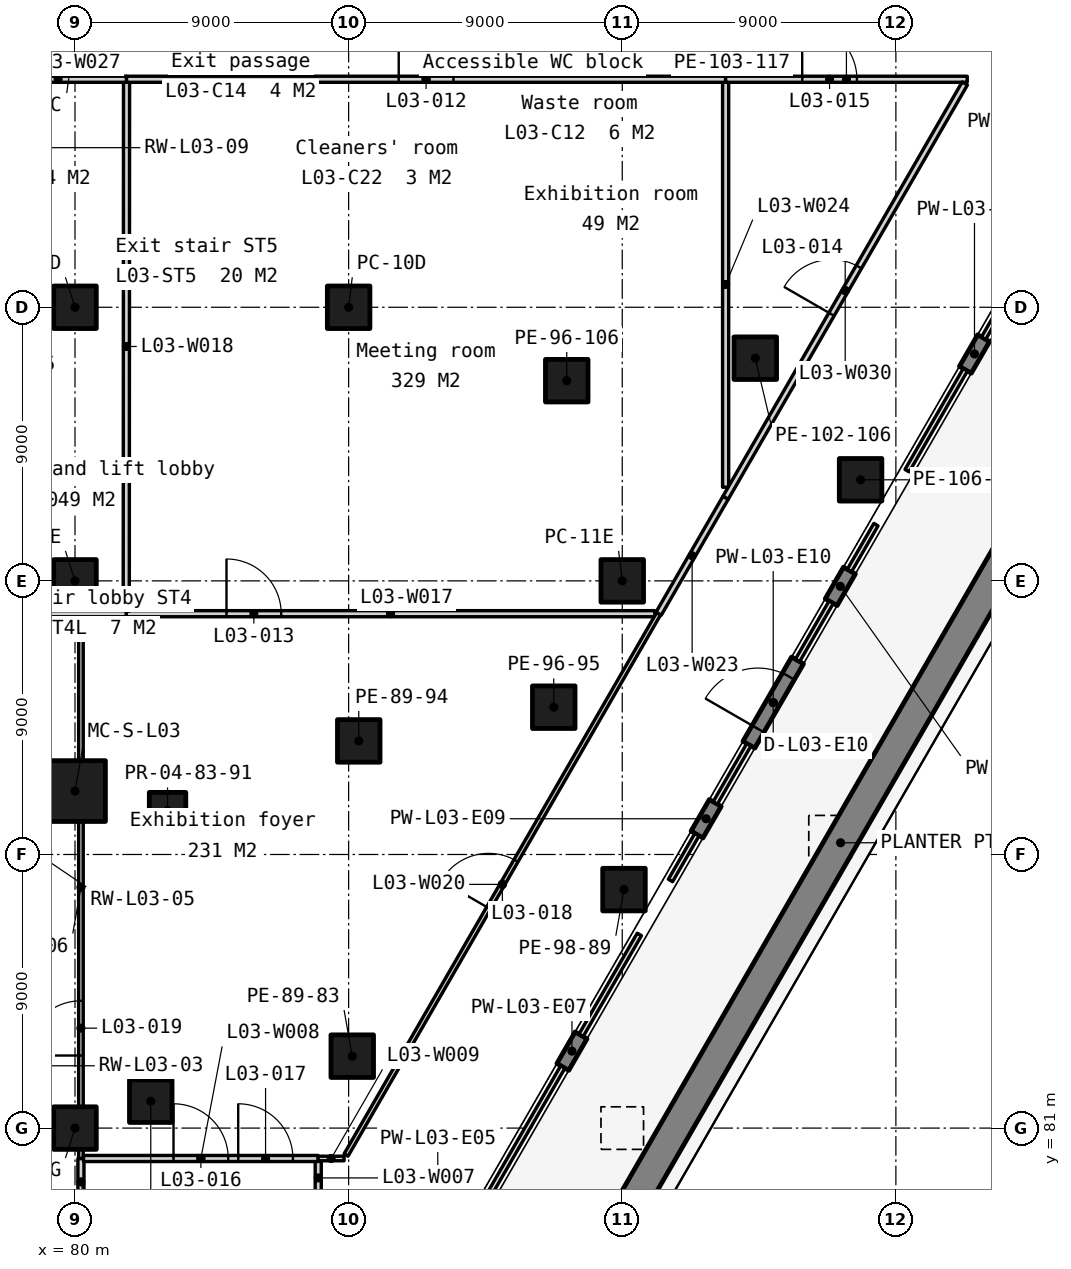
"""IFC4 building model, lengths in metres.
Left out: names, types, materials, properties, quantities, classifications, styles, units other than length and angle.
Written with IfcOpenShell. Run it as: python <this file> out.ifc"""

import sys

from ifc_helpers import new_model, si_unit, direction, frame, frame_2d, origin, origin_2d, place, context, subcontext, project, spatial, rectangle, extrude, element, fill, save


model = new_model("IFC4")
c1 = context("Model", 3, precision=1e-05, world=origin(), true_north=direction((0.0, 1.0)))
c2 = subcontext(c1, "Body", "Model", "MODEL_VIEW")
j1 = project(units=[si_unit("LENGTHUNIT", "METRE"), si_unit("PLANEANGLEUNIT", "RADIAN")], contexts=[c1])
p1 = place(None, origin())
s1 = spatial("IfcSite", under=j1, at=p1, CompositionType="ELEMENT")
p2 = place(p1, origin())
s2 = spatial("IfcBuilding", under=s1, at=p2, CompositionType="ELEMENT")
p3 = place(p2, frame((0.0, 0.0, 19.5)))
s3 = spatial("IfcBuildingStorey", under=s2, at=p3, CompositionType="ELEMENT", Elevation=19.5)
for number, where, z_axis, x_axis in (
    (1, (89.0, 108.0, 0.0), (0.0, 0.0, 1.0), (1.0, 0.0, 0.0)),
    (2, (98.0, 99.0, 0.0), (0.0, 0.0, 1.0), (1.0, 0.0, 0.0)),
    (3, (80.0, 117.0, 0.0), (0.0, 0.0, 1.0), (1.0, 0.0, 0.0)),
    (4, (80.0, 108.0, 0.0), (0.0, 0.0, 1.0), (1.0, 0.0, 0.0)),
    (5, (80.0, 99.0, 0.0), (0.0, 0.0, 1.0), (1.0, 0.0, 0.0)),
    (6, (80.0, 81.0, 0.0), (0.0, 0.0, 1.0), (1.0, 0.0, 0.0)),
    (7, (102.375, 106.325, 0.0), (0.0, 0.0, 1.0), (1.0, 0.0, 0.0)),
    (8, (105.839, 102.325, 0.0), (0.0, 0.0, 1.0), (1.0, 0.0, 0.0)),
    (9, (82.492, 81.886, 0.0), (0.0, 0.0, 1.0), (1.0, 0.0, 0.0)),
    (10, (89.119, 83.366, 0.0), (0.0, 0.0, 1.0), (1.0, 0.0, 0.0)),
    (11, (89.333, 93.736, 0.0), (0.0, 0.0, 1.0), (1.0, 0.0, 0.0)),
    (12, (96.174, 105.585, 0.0), (0.0, 0.0, 1.0), (1.0, 0.0, 0.0)),
    (13, (95.747, 94.845, 0.0), (0.0, 0.0, 1.0), (1.0, 0.0, 0.0)),
    (14, (98.057, 88.845, 0.0), (0.0, 0.0, 1.0), (1.0, 0.0, 0.0)),
):
    element("IfcColumn", number, at=place(p3, frame(where, z_axis=z_axis, x_axis=x_axis)), inside=s3, PredefinedType="COLUMN", context=c2, shape_type="SweptSolid", body=[
        extrude(rectangle(XDim=1.4, YDim=1.4, at=origin_2d()), origin(), (0.0, 0.0, 1.0), 5.5),
    ])
p4 = place(p3, frame((83.044, 91.442, 0.0), z_axis=(0.0, 0.0, 1.0), x_axis=(1.0, 0.0, 0.0)))
e15 = element("IfcColumn", 15, at=p4, inside=s3, PredefinedType="COLUMN", context=c2, shape_type="SweptSolid", body=[
    extrude(rectangle(XDim=1.2, YDim=1.2, at=origin_2d()), origin(), (0.0, 0.0, 1.0), 5.5),
])
p5 = place(p3, frame((80.0, 92.086, 0.0), z_axis=(0.0, 0.0, 1.0), x_axis=(1.0, 0.0, 0.0)))
e16 = element("IfcColumn", 16, at=p5, inside=s3, PredefinedType="COLUMN", context=c2, shape_type="SweptSolid", body=[
    extrude(rectangle(XDim=2.0, YDim=2.0, at=origin_2d()), origin(), (0.0, 0.0, 1.0), 5.5),
])
for number, where, z_axis, x_axis in (
    (17, (96.045, 83.012, -0.25), (0.0, 0.0, 1.0), (0.5, 0.866, 0.0)),
    (18, (100.459, 90.656, -0.25), (0.0, 0.0, 1.0), (0.5, 0.866, 0.0)),
):
    element("IfcWall", number, at=place(p3, frame(where, z_axis=z_axis, x_axis=x_axis)), inside=s3, PredefinedType="SOLIDWALL", context=c2, shape_type="SweptSolid", body=[
        extrude(rectangle(XDim=1.2, YDim=0.45, at=frame_2d((0.6, 0.0))), origin(), (0.0, 0.0, 1.0), 4.812),
    ])
p6 = place(p3, frame((102.165, 93.612, -0.25), z_axis=(0.0, 0.0, 1.0), x_axis=(0.500028443584, 0.866008981251, 0.0)))
e19 = element("IfcWall", 19, at=p6, inside=s3, PredefinedType="SOLIDWALL", context=c2, shape_type="SweptSolid", body=[
    extrude(rectangle(XDim=3.2, YDim=0.45, at=frame_2d((1.6, 0.0))), origin(), (0.0, 0.0, 1.0), 4.812),
])
p7 = place(p6, frame((0.6, 0.0, 0.25)))
e20 = element("IfcOpeningElement", 20, at=p7, cuts=e19, PredefinedType="OPENING", context=c2, shape_type="SweptSolid", body=[
    extrude(rectangle(XDim=2.0, YDim=2.4, at=frame_2d((1.0, 1.2))), frame((0.0, 0.235, 0.0), z_axis=(0.0, -1.0, 0.0), x_axis=(1.0, 0.0, 0.0)), (0.0, 0.0, 1.0), 0.47),
])
p8 = place(p3, frame((104.872, 98.3, -0.25), z_axis=(0.0, 0.0, 1.0), x_axis=(0.500033551112, 0.866006032174, 0.0)))
e21 = element("IfcWall", 21, at=p8, inside=s3, PredefinedType="SOLIDWALL", context=c2, shape_type="SweptSolid", body=[
    extrude(rectangle(XDim=1.2, YDim=0.45, at=frame_2d((0.6, 0.0))), origin(), (0.0, 0.0, 1.0), 4.812),
])
p9 = place(p3, frame((109.285, 105.945, -0.25), z_axis=(0.0, 0.0, 1.0), x_axis=(0.50012165622, 0.865955154139, 0.0)))
e22 = element("IfcWall", 22, at=p9, inside=s3, PredefinedType="SOLIDWALL", context=c2, shape_type="SweptSolid", body=[
    extrude(rectangle(XDim=1.2, YDim=0.45, at=frame_2d((0.6, 0.0))), origin(), (0.0, 0.0, 1.0), 4.812),
])
p10 = place(p3, frame((127.528, 129.091, 0.0), z_axis=(0.0, 0.0, 1.0), x_axis=(-0.500001590908, -0.866024485271, 0.0)))
e23 = element("IfcWall", 23, at=p10, inside=s3, PredefinedType="STANDARD", context=c2, shape_type="SweptSolid", body=[
    extrude(rectangle(XDim=89.388, YDim=1.0, at=frame_2d((44.694, 0.0))), origin(), (0.0, 0.0, 1.0), 0.6),
])
p11 = place(p3, frame((80.195, 78.465, 0.0), z_axis=(0.0, 0.0, 1.0), x_axis=(0.0, 1.0, 0.0)))
e24 = element("IfcWall", 24, at=p11, inside=s3, PredefinedType="PARTITIONING", context=c2, shape_type="SweptSolid", body=[
    extrude(rectangle(XDim=1.535, YDim=0.2, at=frame_2d((0.768, 0.0))), origin(), (0.0, 0.0, 1.0), 4.389),
])
p12 = place(p3, frame((80.195, 80.0, 0.0), z_axis=(0.0, 0.0, 1.0), x_axis=(0.0, 1.0, 0.0)))
e25 = element("IfcWall", 25, at=p12, inside=s3, PredefinedType="PARTITIONING", context=c2, shape_type="SweptSolid", body=[
    extrude(rectangle(XDim=17.835, YDim=0.15, at=frame_2d((8.917, 0.0))), origin(), (0.0, 0.0, 1.0), 4.389),
])
p13 = place(p12, frame((3.387, 0.0, 0.0)))
e26 = element("IfcOpeningElement", 26, at=p13, cuts=e25, PredefinedType="OPENING", context=c2, shape_type="SweptSolid", body=[
    extrude(rectangle(XDim=1.8, YDim=2.1, at=frame_2d((0.9, 1.05))), frame((0.0, 0.085, 0.0), z_axis=(0.0, -1.0, 0.0), x_axis=(1.0, 0.0, 0.0)), (0.0, 0.0, 1.0), 0.17),
])
p14 = place(p3, frame((88.0, 78.807, 0.0), z_axis=(0.0, 0.0, 1.0), x_axis=(0.0, 1.0, 0.0)))
e27 = element("IfcWall", 27, at=p14, inside=s3, PredefinedType="PARTITIONING", context=c2, shape_type="SweptSolid", body=[
    extrude(rectangle(XDim=1.108, YDim=0.2, at=frame_2d((0.554, 0.0))), origin(), (0.0, 0.0, 1.0), 5.25),
])
p15 = place(p3, frame((80.28, 80.0, 0.0), z_axis=(0.0, 0.0, 1.0), x_axis=(1.0, 0.0, 0.0)))
e28 = element("IfcWall", 28, at=p15, inside=s3, PredefinedType="PARTITIONING", context=c2, shape_type="SweptSolid", body=[
    extrude(rectangle(XDim=7.72, YDim=0.2, at=frame_2d((3.86, 0.0))), origin(), (0.0, 0.0, 1.0), 5.25),
])
p16 = place(p15, frame((2.96, 0.0, 0.0)))
e29 = element("IfcOpeningElement", 29, at=p16, cuts=e28, PredefinedType="OPENING", context=c2, shape_type="SweptSolid", body=[
    extrude(rectangle(XDim=1.8, YDim=2.1, at=frame_2d((0.9, 1.05))), frame((0.0, 0.11, 0.0), z_axis=(0.0, -1.0, 0.0), x_axis=(1.0, 0.0, 0.0)), (0.0, 0.0, 1.0), 0.22),
])
p17 = place(p15, frame((5.088, 0.0, 0.0)))
e30 = element("IfcOpeningElement", 30, at=p17, cuts=e28, PredefinedType="OPENING", context=c2, shape_type="SweptSolid", body=[
    extrude(rectangle(XDim=1.8, YDim=2.1, at=frame_2d((0.9, 1.05))), frame((0.0, 0.11, 0.0), z_axis=(0.0, -1.0, 0.0), x_axis=(1.0, 0.0, 0.0)), (0.0, 0.0, 1.0), 0.22),
])
p18 = place(p3, frame((88.0, 80.0, 0.0), z_axis=(0.0, 0.0, 1.0), x_axis=(1.0, 0.0, 0.0)))
e31 = element("IfcWall", 31, at=p18, inside=s3, PredefinedType="PARTITIONING", context=c2, shape_type="SweptSolid", body=[
    extrude(rectangle(XDim=0.851, YDim=0.15, at=frame_2d((0.425, 0.0))), origin(), (0.0, 0.0, 1.0), 5.25),
])
p19 = place(p3, frame((81.686, 97.92, 0.0), z_axis=(0.0, 0.0, 1.0), x_axis=(1.0, 0.0, 0.0)))
e32 = element("IfcWall", 32, at=p19, inside=s3, PredefinedType="PARTITIONING", context=c2, shape_type="SweptSolid", body=[
    extrude(rectangle(XDim=17.386, YDim=0.2, at=frame_2d((8.693, 0.0))), origin(), (0.0, 0.0, 1.0), 5.25),
])
p20 = place(p19, frame((3.297, 0.0, 0.0)))
e33 = element("IfcOpeningElement", 33, at=p20, cuts=e32, PredefinedType="OPENING", context=c2, shape_type="SweptSolid", body=[
    extrude(rectangle(XDim=1.8, YDim=2.1, at=frame_2d((0.9, 1.05))), frame((0.0, 0.11, 0.0), z_axis=(0.0, -1.0, 0.0), x_axis=(1.0, 0.0, 0.0)), (0.0, 0.0, 1.0), 0.22),
])
p21 = place(p3, frame((81.686, 98.005, 0.0), z_axis=(0.0, 0.0, 1.0), x_axis=(0.000574938204, 0.999999834723, 0.0)))
e34 = element("IfcWall", 34, at=p21, inside=s3, PredefinedType="PARTITIONING", context=c2, shape_type="SweptSolid", body=[
    extrude(rectangle(XDim=17.41, YDim=0.2, at=frame_2d((8.705, 0.0))), origin(), (0.0, 0.0, 1.0), 5.25),
])
p22 = place(p3, frame((60.928, 97.92, 0.0), z_axis=(0.0, 0.0, 1.0), x_axis=(1.0, 0.0, 0.0)))
e35 = element("IfcWall", 35, at=p22, inside=s3, PredefinedType="PARTITIONING", context=c2, shape_type="SweptSolid", body=[
    extrude(rectangle(XDim=20.757, YDim=0.2, at=frame_2d((10.378, 0.0))), origin(), (0.0, 0.0, 1.0), 5.25),
])
p23 = place(p22, frame((3.971, 0.0, 0.0)))
e36 = element("IfcOpeningElement", 36, at=p23, cuts=e35, PredefinedType="OPENING", context=c2, shape_type="SweptSolid", body=[
    extrude(rectangle(XDim=1.8, YDim=2.1, at=frame_2d((0.9, 1.05))), frame((0.0, 0.11, 0.0), z_axis=(0.0, -1.0, 0.0), x_axis=(1.0, 0.0, 0.0)), (0.0, 0.0, 1.0), 0.22),
])
p24 = place(p3, frame((88.916, 80.113, 0.0), z_axis=(0.0, 0.0, 1.0), x_axis=(0.499996871816, 0.866027209835, 0.0)))
e37 = element("IfcWall", 37, at=p24, inside=s3, PredefinedType="PARTITIONING", context=c2, shape_type="SweptSolid", body=[
    extrude(rectangle(XDim=20.562, YDim=0.15, at=frame_2d((10.281, 0.0))), origin(), (0.0, 0.0, 1.0), 5.25),
])
p25 = place(p24, frame((9.381, 0.0, 0.0)))
e38 = element("IfcOpeningElement", 38, at=p25, cuts=e37, PredefinedType="OPENING", context=c2, shape_type="SweptSolid", body=[
    extrude(rectangle(XDim=1.8, YDim=2.1, at=frame_2d((0.9, 1.05))), frame((0.0, 0.085, 0.0), z_axis=(0.0, -1.0, 0.0), x_axis=(1.0, 0.0, 0.0)), (0.0, 0.0, 1.0), 0.17),
])
p26 = place(p3, frame((99.197, 97.92, 0.0), z_axis=(0.0, 0.0, 1.0), x_axis=(0.499994207481, 0.866028748071, 0.0)))
e39 = element("IfcWall", 39, at=p26, inside=s3, PredefinedType="PARTITIONING", context=c2, shape_type="SweptSolid", body=[
    extrude(rectangle(XDim=4.407, YDim=0.2, at=frame_2d((2.203, 0.0))), origin(), (0.0, 0.0, 1.0), 5.25),
])
p27 = place(p3, frame((101.4, 102.081, 0.0), z_axis=(0.0, 0.0, 1.0), x_axis=(0.0, 1.0, 0.0)))
e40 = element("IfcWall", 40, at=p27, inside=s3, PredefinedType="PARTITIONING", context=c2, shape_type="SweptSolid", body=[
    extrude(rectangle(XDim=13.334, YDim=0.2, at=frame_2d((6.667, 0.0))), origin(), (0.0, 0.0, 1.0), 4.389),
])
p28 = place(p3, frame((77.195, 115.5, 0.0), z_axis=(0.0, 0.0, 1.0), x_axis=(1.0, 0.0, 0.0)))
e41 = element("IfcWall", 41, at=p28, inside=s3, PredefinedType="PARTITIONING", context=c2, shape_type="SweptSolid", body=[
    extrude(rectangle(XDim=4.5, YDim=0.2, at=frame_2d((2.25, 0.0))), origin(), (0.0, 0.0, 1.0), 5.25),
])
p29 = place(p3, frame((81.696, 115.5, 0.0), z_axis=(0.0, 0.0, 1.0), x_axis=(1.0, 0.0, 0.0)))
e42 = element("IfcWall", 42, at=p29, inside=s3, PredefinedType="PARTITIONING", context=c2, shape_type="SweptSolid", body=[
    extrude(rectangle(XDim=19.704, YDim=0.2, at=frame_2d((9.852, 0.0))), origin(), (0.0, 0.0, 1.0), 5.25),
])
p30 = place(p29, frame((8.952, 0.0, 0.0)))
e43 = element("IfcOpeningElement", 43, at=p30, cuts=e42, PredefinedType="OPENING", context=c2, shape_type="SweptSolid", body=[
    extrude(rectangle(XDim=1.8, YDim=2.1, at=frame_2d((0.9, 1.05))), frame((0.0, 0.11, 0.0), z_axis=(0.0, -1.0, 0.0), x_axis=(1.0, 0.0, 0.0)), (0.0, 0.0, 1.0), 0.22),
])
p31 = place(p3, frame((101.4, 115.5, 0.0), z_axis=(0.0, 0.0, 1.0), x_axis=(1.0, 0.0, 0.0)))
e44 = element("IfcWall", 44, at=p31, inside=s3, PredefinedType="PARTITIONING", context=c2, shape_type="SweptSolid", body=[
    extrude(rectangle(XDim=7.947, YDim=0.2, at=frame_2d((3.973, 0.0))), origin(), (0.0, 0.0, 1.0), 5.25),
])
p32 = place(p31, frame((2.519, 0.0, 0.0)))
e45 = element("IfcOpeningElement", 45, at=p32, cuts=e44, PredefinedType="OPENING", context=c2, shape_type="SweptSolid", body=[
    extrude(rectangle(XDim=1.8, YDim=2.1, at=frame_2d((0.9, 1.05))), frame((0.0, 0.11, 0.0), z_axis=(0.0, -1.0, 0.0), x_axis=(1.0, 0.0, 0.0)), (0.0, 0.0, 1.0), 0.22),
])
p33 = place(p3, frame((101.4, 101.736, 0.0), z_axis=(0.0, 0.0, 1.0), x_axis=(0.499996029325, 0.866027696242, 0.0)))
e46 = element("IfcWall", 46, at=p33, inside=s3, PredefinedType="PARTITIONING", context=c2, shape_type="SweptSolid", body=[
    extrude(rectangle(XDim=15.733, YDim=0.2, at=frame_2d((7.867, 0.0))), origin(), (0.0, 0.0, 1.0), 5.25),
])
p34 = place(p33, frame((6.967, 0.0, 0.0)))
e47 = element("IfcOpeningElement", 47, at=p34, cuts=e46, PredefinedType="OPENING", context=c2, shape_type="SweptSolid", body=[
    extrude(rectangle(XDim=1.8, YDim=2.1, at=frame_2d((0.9, 1.05))), frame((0.0, 0.11, 0.0), z_axis=(0.0, -1.0, 0.0), x_axis=(1.0, 0.0, 0.0)), (0.0, 0.0, 1.0), 0.22),
])
p35 = place(p7, origin())
e48 = element("IfcDoor", 48, at=p35, inside=s3, OperationType="DOUBLE_DOOR_SINGLE_SWING", PredefinedType="DOOR", context=c2, shape_type="SweptSolid", body=[
    extrude(rectangle(XDim=2.0, YDim=2.4, at=frame_2d((1.0, 1.2))), frame((0.0, 0.025, 0.0), z_axis=(0.0, -1.0, 0.0), x_axis=(1.0, 0.0, 0.0)), (0.0, 0.0, 1.0), 0.05),
])
fill(e20, e48)
p36 = place(p30, origin())
e49 = element("IfcDoor", 49, at=p36, inside=s3, OperationType="SINGLE_SWING_LEFT", PredefinedType="DOOR", context=c2, shape_type="SweptSolid", body=[
    extrude(rectangle(XDim=1.8, YDim=2.1, at=frame_2d((0.9, 1.05))), frame((0.0, 0.025, 0.0), z_axis=(0.0, -1.0, 0.0), x_axis=(1.0, 0.0, 0.0)), (0.0, 0.0, 1.0), 0.05),
])
fill(e43, e49)
p37 = place(p20, origin())
e50 = element("IfcDoor", 50, at=p37, inside=s3, OperationType="SINGLE_SWING_LEFT", PredefinedType="DOOR", context=c2, shape_type="SweptSolid", body=[
    extrude(rectangle(XDim=1.8, YDim=2.1, at=frame_2d((0.9, 1.05))), frame((0.0, 0.025, 0.0), z_axis=(0.0, -1.0, 0.0), x_axis=(1.0, 0.0, 0.0)), (0.0, 0.0, 1.0), 0.05),
])
fill(e33, e50)
p38 = place(p34, origin())
e51 = element("IfcDoor", 51, at=p38, inside=s3, OperationType="SINGLE_SWING_LEFT", PredefinedType="DOOR", context=c2, shape_type="SweptSolid", body=[
    extrude(rectangle(XDim=1.8, YDim=2.1, at=frame_2d((0.9, 1.05))), frame((0.0, 0.025, 0.0), z_axis=(0.0, -1.0, 0.0), x_axis=(1.0, 0.0, 0.0)), (0.0, 0.0, 1.0), 0.05),
])
fill(e47, e51)
p39 = place(p32, origin())
e52 = element("IfcDoor", 52, at=p39, inside=s3, OperationType="SINGLE_SWING_LEFT", PredefinedType="DOOR", context=c2, shape_type="SweptSolid", body=[
    extrude(rectangle(XDim=1.8, YDim=2.1, at=frame_2d((0.9, 1.05))), frame((0.0, 0.025, 0.0), z_axis=(0.0, -1.0, 0.0), x_axis=(1.0, 0.0, 0.0)), (0.0, 0.0, 1.0), 0.05),
])
fill(e45, e52)
p40 = place(p16, origin())
e53 = element("IfcDoor", 53, at=p40, inside=s3, OperationType="SINGLE_SWING_LEFT", PredefinedType="DOOR", context=c2, shape_type="SweptSolid", body=[
    extrude(rectangle(XDim=1.8, YDim=2.1, at=frame_2d((0.9, 1.05))), frame((0.0, 0.025, 0.0), z_axis=(0.0, -1.0, 0.0), x_axis=(1.0, 0.0, 0.0)), (0.0, 0.0, 1.0), 0.05),
])
fill(e29, e53)
p41 = place(p17, origin())
e54 = element("IfcDoor", 54, at=p41, inside=s3, OperationType="SINGLE_SWING_LEFT", PredefinedType="DOOR", context=c2, shape_type="SweptSolid", body=[
    extrude(rectangle(XDim=1.8, YDim=2.1, at=frame_2d((0.9, 1.05))), frame((0.0, 0.025, 0.0), z_axis=(0.0, -1.0, 0.0), x_axis=(1.0, 0.0, 0.0)), (0.0, 0.0, 1.0), 0.05),
])
fill(e30, e54)
p42 = place(p25, origin())
e55 = element("IfcDoor", 55, at=p42, inside=s3, OperationType="SINGLE_SWING_LEFT", PredefinedType="DOOR", context=c2, shape_type="SweptSolid", body=[
    extrude(rectangle(XDim=1.8, YDim=2.1, at=frame_2d((0.9, 1.05))), frame((0.0, 0.025, 0.0), z_axis=(0.0, -1.0, 0.0), x_axis=(1.0, 0.0, 0.0)), (0.0, 0.0, 1.0), 0.05),
])
fill(e38, e55)
p43 = place(p13, origin())
e56 = element("IfcDoor", 56, at=p43, inside=s3, OperationType="SINGLE_SWING_LEFT", PredefinedType="DOOR", context=c2, shape_type="SweptSolid", body=[
    extrude(rectangle(XDim=1.8, YDim=2.1, at=frame_2d((0.9, 1.05))), frame((0.0, 0.025, 0.0), z_axis=(0.0, -1.0, 0.0), x_axis=(1.0, 0.0, 0.0)), (0.0, 0.0, 1.0), 0.05),
])
fill(e26, e56)
save(model, sys.argv[1])
